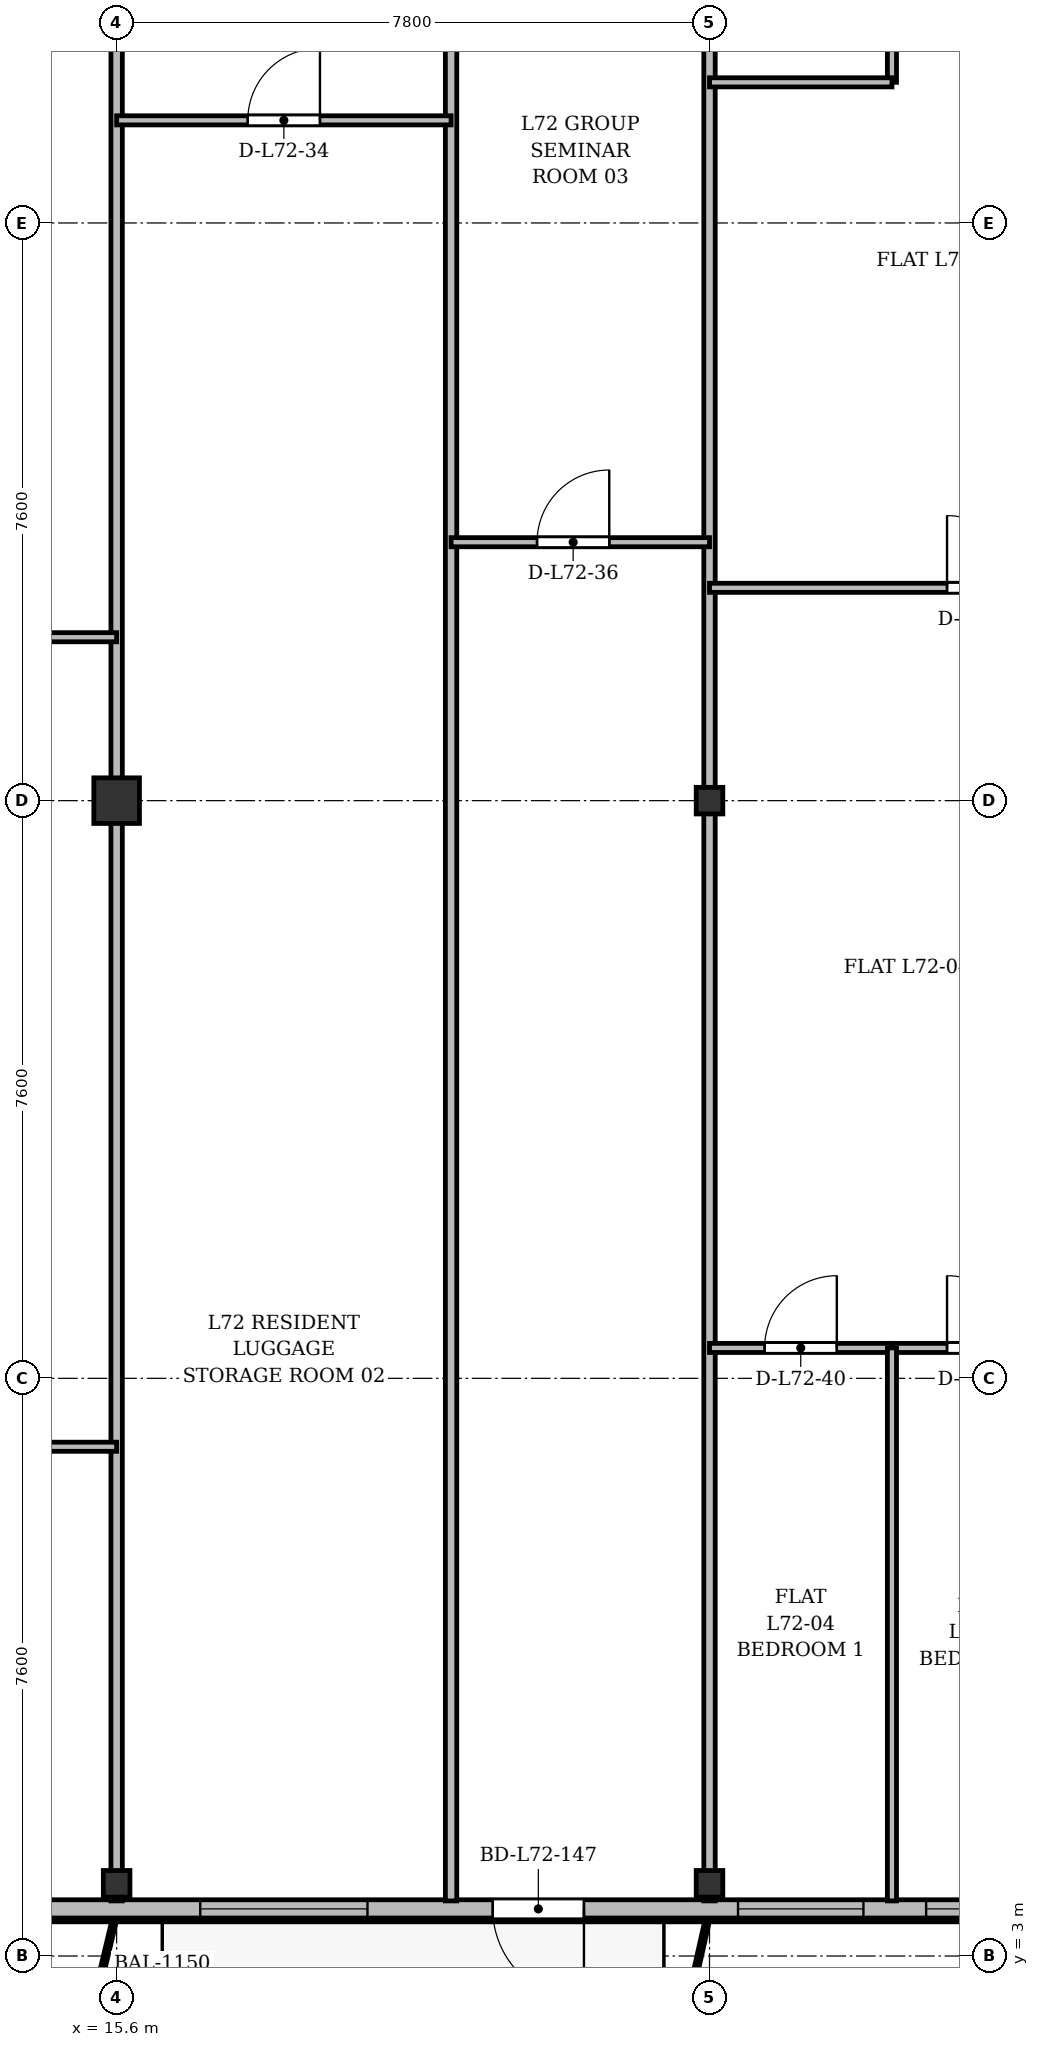
"""IFC4 building model, lengths in metres.
Left out: names, types, materials, properties, quantities, classifications, styles, units other than length and angle.
Written with IfcOpenShell. Run it as: python <this file> out.ifc"""

import sys

from ifc_helpers import new_model, si_unit, direction, frame, frame_2d, origin, origin_2d, place, context, subcontext, project, spatial, rectangle, i_section, extrude, source, transform, mapped, element, fill, save


model = new_model("IFC4")
c1 = context("Model", 3, precision=1e-05, world=origin(), true_north=direction((0.0, 1.0)))
c2 = subcontext(c1, "Body", "Model", "MODEL_VIEW")
j1 = project(units=[si_unit("LENGTHUNIT", "METRE"), si_unit("PLANEANGLEUNIT", "RADIAN")], contexts=[c1])
p1 = place(None, origin())
s1 = spatial("IfcSite", under=j1, at=p1, CompositionType="ELEMENT")
p2 = place(p1, origin())
s2 = spatial("IfcBuilding", under=s1, at=p2, CompositionType="ELEMENT")
p3 = place(p2, frame((0.0, 0.0, 277.5)))
s3 = spatial("IfcBuildingStorey", under=s2, at=p3, CompositionType="ELEMENT", Elevation=277.5)
m1 = source(origin(), c2, "Body", "SweptSolid", [
    extrude(i_section(OverallWidth=0.35, OverallDepth=0.35, WebThickness=0.018, FlangeThickness=0.028, at=origin_2d()), origin(), (0.0, 0.0, 1.0), 3.6),
])
p4 = place(p3, frame((15.6, 3.95, 0.0), z_axis=(0.0, 0.0, 1.0), x_axis=(1.0, 0.0, 0.0)))
e1 = element("IfcColumn", 1, at=p4, inside=s3, PredefinedType="COLUMN", context=c2, shape_type="MappedRepresentation", body=[
    mapped(m1, transform((0.0, 0.0, 0.0), x_axis=(1.0, 0.0, 0.0), y_axis=(0.0, 1.0, 0.0), z_axis=(0.0, 0.0, 1.0), scale=1.0)),
])
m2 = source(origin(), c2, "Body", "SweptSolid", [
    extrude(rectangle(XDim=0.6, YDim=0.6, at=origin_2d()), origin(), (0.0, 0.0, 1.0), 3.6),
])
p5 = place(p3, frame((15.6, 18.2, 0.0), z_axis=(0.0, 0.0, 1.0), x_axis=(1.0, 0.0, 0.0)))
e2 = element("IfcColumn", 2, at=p5, inside=s3, PredefinedType="COLUMN", context=c2, shape_type="MappedRepresentation", body=[
    mapped(m2, transform((0.0, 0.0, 0.0), x_axis=(1.0, 0.0, 0.0), y_axis=(0.0, 1.0, 0.0), z_axis=(0.0, 0.0, 1.0), scale=1.0)),
])
for number, where, z_axis, x_axis in (
    (3, (23.4, 3.95, 0.0), (0.0, 0.0, 1.0), (1.0, 0.0, 0.0)),
    (4, (23.4, 18.2, 0.0), (0.0, 0.0, 1.0), (1.0, 0.0, 0.0)),
):
    element("IfcColumn", number, at=place(p3, frame(where, z_axis=z_axis, x_axis=x_axis)), inside=s3, PredefinedType="COLUMN", context=c2, shape_type="MappedRepresentation", body=[
        mapped(m1, transform((0.0, 0.0, 0.0), x_axis=(1.0, 0.0, 0.0), y_axis=(0.0, 1.0, 0.0), z_axis=(0.0, 0.0, 1.0), scale=1.0)),
    ])
p6 = place(p3, frame((63.2, 3.62, 0.0), z_axis=(0.0, 0.0, 1.0), x_axis=(-1.0, 0.0, 0.0)))
e5 = element("IfcWall", 5, at=p6, inside=s3, PredefinedType="SOLIDWALL", context=c2, shape_type="SweptSolid", body=[
    extrude(rectangle(XDim=52.0, YDim=0.24, at=frame_2d((26.0, 0.0))), origin(), (0.0, 0.0, 1.0), 3.37),
])
p7 = place(p6, frame((1.495, 0.0, 0.9)))
e6 = element("IfcOpeningElement", 6, at=p7, cuts=e5, PredefinedType="OPENING", context=c2, shape_type="SweptSolid", body=[
    extrude(rectangle(XDim=1.5, YDim=1.75, at=frame_2d((0.75, 0.875))), frame((0.0, 0.13, 0.0), z_axis=(0.0, -1.0, 0.0), x_axis=(1.0, 0.0, 0.0)), (0.0, 0.0, 1.0), 0.26),
])
p8 = place(p6, frame((5.2, 0.0, 0.9)))
e7 = element("IfcOpeningElement", 7, at=p8, cuts=e5, PredefinedType="OPENING", context=c2, shape_type="SweptSolid", body=[
    extrude(rectangle(XDim=2.0, YDim=1.95, at=frame_2d((1.0, 0.975))), frame((0.0, 0.13, 0.0), z_axis=(0.0, -1.0, 0.0), x_axis=(1.0, 0.0, 0.0)), (0.0, 0.0, 1.0), 0.26),
])
p9 = place(p6, frame((9.275, 0.0, 0.9)))
e8 = element("IfcOpeningElement", 8, at=p9, cuts=e5, PredefinedType="OPENING", context=c2, shape_type="SweptSolid", body=[
    extrude(rectangle(XDim=1.65, YDim=1.85, at=frame_2d((0.825, 0.925))), frame((0.0, 0.13, 0.0), z_axis=(0.0, -1.0, 0.0), x_axis=(1.0, 0.0, 0.0)), (0.0, 0.0, 1.0), 0.26),
])
p10 = place(p6, frame((14.017, 0.0, 0.0)))
e9 = element("IfcOpeningElement", 9, at=p10, cuts=e5, PredefinedType="OPENING", context=c2, shape_type="SweptSolid", body=[
    extrude(rectangle(XDim=1.2, YDim=2.2, at=frame_2d((0.6, 1.1))), frame((0.0, 0.13, 0.0), z_axis=(0.0, -1.0, 0.0), x_axis=(1.0, 0.0, 0.0)), (0.0, 0.0, 1.0), 0.26),
])
p11 = place(p6, frame((24.9, 0.0, 0.9)))
e10 = element("IfcOpeningElement", 10, at=p11, cuts=e5, PredefinedType="OPENING", context=c2, shape_type="SweptSolid", body=[
    extrude(rectangle(XDim=2.2, YDim=1.8, at=frame_2d((1.1, 0.9))), frame((0.0, 0.13, 0.0), z_axis=(0.0, -1.0, 0.0), x_axis=(1.0, 0.0, 0.0)), (0.0, 0.0, 1.0), 0.26),
])
p12 = place(p6, frame((33.05, 0.0, 0.9)))
e11 = element("IfcOpeningElement", 11, at=p12, cuts=e5, PredefinedType="OPENING", context=c2, shape_type="SweptSolid", body=[
    extrude(rectangle(XDim=1.5, YDim=1.75, at=frame_2d((0.75, 0.875))), frame((0.0, 0.13, 0.0), z_axis=(0.0, -1.0, 0.0), x_axis=(1.0, 0.0, 0.0)), (0.0, 0.0, 1.0), 0.26),
])
p13 = place(p6, frame((35.45, 0.0, 0.9)))
e12 = element("IfcOpeningElement", 12, at=p13, cuts=e5, PredefinedType="OPENING", context=c2, shape_type="SweptSolid", body=[
    extrude(rectangle(XDim=1.5, YDim=1.75, at=frame_2d((0.75, 0.875))), frame((0.0, 0.13, 0.0), z_axis=(0.0, -1.0, 0.0), x_axis=(1.0, 0.0, 0.0)), (0.0, 0.0, 1.0), 0.26),
])
p14 = place(p6, frame((37.775, 0.0, 0.9)))
e13 = element("IfcOpeningElement", 13, at=p14, cuts=e5, PredefinedType="OPENING", context=c2, shape_type="SweptSolid", body=[
    extrude(rectangle(XDim=1.65, YDim=1.85, at=frame_2d((0.825, 0.925))), frame((0.0, 0.13, 0.0), z_axis=(0.0, -1.0, 0.0), x_axis=(1.0, 0.0, 0.0)), (0.0, 0.0, 1.0), 0.26),
])
p15 = place(p6, frame((41.452, 0.0, 0.0)))
e14 = element("IfcOpeningElement", 14, at=p15, cuts=e5, PredefinedType="OPENING", context=c2, shape_type="SweptSolid", body=[
    extrude(rectangle(XDim=1.2, YDim=2.2, at=frame_2d((0.6, 1.1))), frame((0.0, 0.13, 0.0), z_axis=(0.0, -1.0, 0.0), x_axis=(1.0, 0.0, 0.0)), (0.0, 0.0, 1.0), 0.26),
])
p16 = place(p6, frame((44.3, 0.0, 0.9)))
e15 = element("IfcOpeningElement", 15, at=p16, cuts=e5, PredefinedType="OPENING", context=c2, shape_type="SweptSolid", body=[
    extrude(rectangle(XDim=2.2, YDim=1.8, at=frame_2d((1.1, 0.9))), frame((0.0, 0.13, 0.0), z_axis=(0.0, -1.0, 0.0), x_axis=(1.0, 0.0, 0.0)), (0.0, 0.0, 1.0), 0.26),
])
p17 = place(p6, frame((49.005, 0.0, 0.9)))
e16 = element("IfcOpeningElement", 16, at=p17, cuts=e5, PredefinedType="OPENING", context=c2, shape_type="SweptSolid", body=[
    extrude(rectangle(XDim=1.5, YDim=1.75, at=frame_2d((0.75, 0.875))), frame((0.0, 0.13, 0.0), z_axis=(0.0, -1.0, 0.0), x_axis=(1.0, 0.0, 0.0)), (0.0, 0.0, 1.0), 0.26),
])
p18 = place(p3, frame((15.6, 3.725, 0.0), z_axis=(0.0, 0.0, 1.0), x_axis=(0.0, 1.0, 0.0)))
e17 = element("IfcWall", 17, at=p18, inside=s3, PredefinedType="PARTITIONING", context=c2, shape_type="SweptSolid", body=[
    extrude(rectangle(XDim=27.275, YDim=0.15, at=frame_2d((13.637, 0.0))), origin(), (0.0, 0.0, 1.0), 2.87),
])
p19 = place(p3, frame((20.0, 3.725, 0.0), z_axis=(0.0, 0.0, 1.0), x_axis=(0.0, 1.0, 0.0)))
e18 = element("IfcWall", 18, at=p19, inside=s3, PredefinedType="PARTITIONING", context=c2, shape_type="SweptSolid", body=[
    extrude(rectangle(XDim=27.275, YDim=0.15, at=frame_2d((13.637, 0.0))), origin(), (0.0, 0.0, 1.0), 2.92),
])
p20 = place(p3, frame((23.4, 3.725, 0.0), z_axis=(0.0, 0.0, 1.0), x_axis=(0.0, 1.0, 0.0)))
e19 = element("IfcWall", 19, at=p20, inside=s3, PredefinedType="PARTITIONING", context=c2, shape_type="SweptSolid", body=[
    extrude(rectangle(XDim=27.275, YDim=0.15, at=frame_2d((13.637, 0.0))), origin(), (0.0, 0.0, 1.0), 2.87),
])
p21 = place(p3, frame((8.44, 20.35, 0.0), z_axis=(0.0, 0.0, 1.0), x_axis=(1.0, 0.0, 0.0)))
e20 = element("IfcWall", 20, at=p21, inside=s3, PredefinedType="PARTITIONING", context=c2, shape_type="SweptSolid", body=[
    extrude(rectangle(XDim=7.16, YDim=0.12, at=frame_2d((3.58, 0.0))), origin(), (0.0, 0.0, 1.0), 2.87),
])
p22 = place(p21, frame((3.105, 0.0, 0.0)))
e21 = element("IfcOpeningElement", 21, at=p22, cuts=e20, PredefinedType="OPENING", context=c2, shape_type="SweptSolid", body=[
    extrude(rectangle(XDim=0.95, YDim=2.15, at=frame_2d((0.475, 1.075))), frame((0.0, 0.07, 0.0), z_axis=(0.0, -1.0, 0.0), x_axis=(1.0, 0.0, 0.0)), (0.0, 0.0, 1.0), 0.14),
])
p23 = place(p3, frame((8.44, 9.7, 0.0), z_axis=(0.0, 0.0, 1.0), x_axis=(1.0, 0.0, 0.0)))
e22 = element("IfcWall", 22, at=p23, inside=s3, PredefinedType="PARTITIONING", context=c2, shape_type="SweptSolid", body=[
    extrude(rectangle(XDim=7.16, YDim=0.12, at=frame_2d((3.58, 0.0))), origin(), (0.0, 0.0, 1.0), 2.87),
])
p24 = place(p23, frame((3.105, 0.0, 0.0)))
e23 = element("IfcOpeningElement", 23, at=p24, cuts=e22, PredefinedType="OPENING", context=c2, shape_type="SweptSolid", body=[
    extrude(rectangle(XDim=0.95, YDim=2.15, at=frame_2d((0.475, 1.075))), frame((0.0, 0.07, 0.0), z_axis=(0.0, -1.0, 0.0), x_axis=(1.0, 0.0, 0.0)), (0.0, 0.0, 1.0), 0.14),
])
p25 = place(p3, frame((15.6, 27.15, 0.0), z_axis=(0.0, 0.0, 1.0), x_axis=(1.0, 0.0, 0.0)))
e24 = element("IfcWall", 24, at=p25, inside=s3, PredefinedType="PARTITIONING", context=c2, shape_type="SweptSolid", body=[
    extrude(rectangle(XDim=4.4, YDim=0.12, at=frame_2d((2.2, 0.0))), origin(), (0.0, 0.0, 1.0), 2.87),
])
p26 = place(p25, frame((1.725, 0.0, 0.0)))
e25 = element("IfcOpeningElement", 25, at=p26, cuts=e24, PredefinedType="OPENING", context=c2, shape_type="SweptSolid", body=[
    extrude(rectangle(XDim=0.95, YDim=2.15, at=frame_2d((0.475, 1.075))), frame((0.0, 0.07, 0.0), z_axis=(0.0, -1.0, 0.0), x_axis=(1.0, 0.0, 0.0)), (0.0, 0.0, 1.0), 0.14),
])
p27 = place(p3, frame((20.0, 21.6, 0.0), z_axis=(0.0, 0.0, 1.0), x_axis=(1.0, 0.0, 0.0)))
e26 = element("IfcWall", 26, at=p27, inside=s3, PredefinedType="PARTITIONING", context=c2, shape_type="SweptSolid", body=[
    extrude(rectangle(XDim=3.4, YDim=0.12, at=frame_2d((1.7, 0.0))), origin(), (0.0, 0.0, 1.0), 2.87),
])
p28 = place(p27, frame((1.131, 0.0, 0.0)))
e27 = element("IfcOpeningElement", 27, at=p28, cuts=e26, PredefinedType="OPENING", context=c2, shape_type="SweptSolid", body=[
    extrude(rectangle(XDim=0.95, YDim=2.15, at=frame_2d((0.475, 1.075))), frame((0.0, 0.07, 0.0), z_axis=(0.0, -1.0, 0.0), x_axis=(1.0, 0.0, 0.0)), (0.0, 0.0, 1.0), 0.14),
])
p29 = place(p3, frame((23.4, 21.0, 0.0), z_axis=(0.0, 0.0, 1.0), x_axis=(1.0, 0.0, 0.0)))
e28 = element("IfcWall", 28, at=p29, inside=s3, PredefinedType="PARTITIONING", context=c2, shape_type="SweptSolid", body=[
    extrude(rectangle(XDim=7.2, YDim=0.12, at=frame_2d((3.6, 0.0))), origin(), (0.0, 0.0, 1.0), 2.87),
])
p30 = place(p29, frame((3.125, 0.0, 0.0)))
e29 = element("IfcOpeningElement", 29, at=p30, cuts=e28, PredefinedType="OPENING", context=c2, shape_type="SweptSolid", body=[
    extrude(rectangle(XDim=0.95, YDim=2.15, at=frame_2d((0.475, 1.075))), frame((0.0, 0.07, 0.0), z_axis=(0.0, -1.0, 0.0), x_axis=(1.0, 0.0, 0.0)), (0.0, 0.0, 1.0), 0.14),
])
p31 = place(p3, frame((25.8, 27.65, 0.0), z_axis=(0.0, 0.0, 1.0), x_axis=(0.0, 1.0, 0.0)))
e30 = element("IfcWall", 30, at=p31, inside=s3, PredefinedType="PARTITIONING", context=c2, shape_type="SweptSolid", body=[
    extrude(rectangle(XDim=3.35, YDim=0.12, at=frame_2d((1.675, 0.0))), origin(), (0.0, 0.0, 1.0), 3.37),
])
p32 = place(p31, frame((0.8, 0.0, 0.0)))
e31 = element("IfcOpeningElement", 31, at=p32, cuts=e30, PredefinedType="OPENING", context=c2, shape_type="SweptSolid", body=[
    extrude(rectangle(XDim=0.85, YDim=2.1, at=frame_2d((0.425, 1.05))), frame((0.0, 0.07, 0.0), z_axis=(0.0, -1.0, 0.0), x_axis=(1.0, 0.0, 0.0)), (0.0, 0.0, 1.0), 0.14),
])
p33 = place(p3, frame((23.4, 27.65, 0.0), z_axis=(0.0, 0.0, 1.0), x_axis=(1.0, 0.0, 0.0)))
e32 = element("IfcWall", 32, at=p33, inside=s3, PredefinedType="PARTITIONING", context=c2, shape_type="SweptSolid", body=[
    extrude(rectangle(XDim=2.4, YDim=0.12, at=frame_2d((1.2, 0.0))), origin(), (0.0, 0.0, 1.0), 2.87),
])
p34 = place(p3, frame((23.4, 11.0, 0.0), z_axis=(0.0, 0.0, 1.0), x_axis=(1.0, 0.0, 0.0)))
e33 = element("IfcWall", 33, at=p34, inside=s3, PredefinedType="PARTITIONING", context=c2, shape_type="SweptSolid", body=[
    extrude(rectangle(XDim=2.4, YDim=0.12, at=frame_2d((1.2, 0.0))), origin(), (0.0, 0.0, 1.0), 2.87),
])
p35 = place(p34, frame((0.725, 0.0, 0.0)))
e34 = element("IfcOpeningElement", 34, at=p35, cuts=e33, PredefinedType="OPENING", context=c2, shape_type="SweptSolid", body=[
    extrude(rectangle(XDim=0.95, YDim=2.15, at=frame_2d((0.475, 1.075))), frame((0.0, 0.07, 0.0), z_axis=(0.0, -1.0, 0.0), x_axis=(1.0, 0.0, 0.0)), (0.0, 0.0, 1.0), 0.14),
])
p36 = place(p3, frame((25.8, 11.0, 0.0), z_axis=(0.0, 0.0, 1.0), x_axis=(1.0, 0.0, 0.0)))
e35 = element("IfcWall", 35, at=p36, inside=s3, PredefinedType="PARTITIONING", context=c2, shape_type="SweptSolid", body=[
    extrude(rectangle(XDim=2.4, YDim=0.12, at=frame_2d((1.2, 0.0))), origin(), (0.0, 0.0, 1.0), 3.07),
])
p37 = place(p36, frame((0.725, 0.0, 0.0)))
e36 = element("IfcOpeningElement", 36, at=p37, cuts=e35, PredefinedType="OPENING", context=c2, shape_type="SweptSolid", body=[
    extrude(rectangle(XDim=0.95, YDim=2.15, at=frame_2d((0.475, 1.075))), frame((0.0, 0.07, 0.0), z_axis=(0.0, -1.0, 0.0), x_axis=(1.0, 0.0, 0.0)), (0.0, 0.0, 1.0), 0.14),
])
p38 = place(p3, frame((25.8, 3.725, 0.0), z_axis=(0.0, 0.0, 1.0), x_axis=(0.0, 1.0, 0.0)))
e37 = element("IfcWall", 37, at=p38, inside=s3, PredefinedType="PARTITIONING", context=c2, shape_type="SweptSolid", body=[
    extrude(rectangle(XDim=7.275, YDim=0.12, at=frame_2d((3.637, 0.0))), origin(), (0.0, 0.0, 1.0), 2.92),
])
m3 = source(origin(), c2, "Body", "SweptSolid", [
    extrude(rectangle(XDim=1.5, YDim=1.75, at=frame_2d((0.75, 0.875))), frame((0.0, 0.03, 0.0), z_axis=(0.0, -1.0, 0.0), x_axis=(1.0, 0.0, 0.0)), (0.0, 0.0, 1.0), 0.06),
])
p39 = place(p13, origin())
e38 = element("IfcWindow", 38, at=p39, inside=s3, PartitioningType="SINGLE_PANEL", PredefinedType="WINDOW", context=c2, shape_type="MappedRepresentation", body=[
    mapped(m3, transform((0.0, 0.0, 0.0), x_axis=(1.0, 0.0, 0.0), y_axis=(0.0, 1.0, 0.0), z_axis=(0.0, 0.0, 1.0), scale=1.0)),
])
fill(e12, e38)
m4 = source(origin(), c2, "Body", "SweptSolid", [
    extrude(rectangle(XDim=1.65, YDim=1.85, at=frame_2d((0.825, 0.925))), frame((0.0, 0.03, 0.0), z_axis=(0.0, -1.0, 0.0), x_axis=(1.0, 0.0, 0.0)), (0.0, 0.0, 1.0), 0.06),
])
p40 = place(p14, origin())
e39 = element("IfcWindow", 39, at=p40, inside=s3, PartitioningType="SINGLE_PANEL", PredefinedType="WINDOW", context=c2, shape_type="MappedRepresentation", body=[
    mapped(m4, transform((0.0, 0.0, 0.0), x_axis=(1.0, 0.0, 0.0), y_axis=(0.0, 1.0, 0.0), z_axis=(0.0, 0.0, 1.0), scale=1.0)),
])
fill(e13, e39)
m5 = source(origin(), c2, "Body", "SweptSolid", [
    extrude(rectangle(XDim=1.2, YDim=2.2, at=frame_2d((0.6, 1.1))), frame((0.0, 0.025, 0.0), z_axis=(0.0, -1.0, 0.0), x_axis=(1.0, 0.0, 0.0)), (0.0, 0.0, 1.0), 0.05),
])
p41 = place(p15, origin())
e40 = element("IfcDoor", 40, at=p41, inside=s3, OperationType="SINGLE_SWING_LEFT", PredefinedType="DOOR", context=c2, shape_type="MappedRepresentation", body=[
    mapped(m5, transform((0.0, 0.0, 0.0), x_axis=(1.0, 0.0, 0.0), y_axis=(0.0, 1.0, 0.0), z_axis=(0.0, 0.0, 1.0), scale=1.0)),
])
fill(e14, e40)
m6 = source(origin(), c2, "Body", "SweptSolid", [
    extrude(rectangle(XDim=2.2, YDim=1.8, at=frame_2d((1.1, 0.9))), frame((0.0, 0.03, 0.0), z_axis=(0.0, -1.0, 0.0), x_axis=(1.0, 0.0, 0.0)), (0.0, 0.0, 1.0), 0.06),
])
p42 = place(p16, origin())
e41 = element("IfcWindow", 41, at=p42, inside=s3, PartitioningType="SINGLE_PANEL", PredefinedType="WINDOW", context=c2, shape_type="MappedRepresentation", body=[
    mapped(m6, transform((0.0, 0.0, 0.0), x_axis=(1.0, 0.0, 0.0), y_axis=(0.0, 1.0, 0.0), z_axis=(0.0, 0.0, 1.0), scale=1.0)),
])
fill(e15, e41)
m7 = source(origin(), c2, "Body", "SweptSolid", [
    extrude(rectangle(XDim=0.95, YDim=2.15, at=frame_2d((0.475, 1.075))), frame((0.0, 0.025, 0.0), z_axis=(0.0, -1.0, 0.0), x_axis=(1.0, 0.0, 0.0)), (0.0, 0.0, 1.0), 0.05),
])
p43 = place(p26, origin())
e42 = element("IfcDoor", 42, at=p43, inside=s3, OperationType="SINGLE_SWING_RIGHT", PredefinedType="DOOR", context=c2, shape_type="MappedRepresentation", body=[
    mapped(m7, transform((0.0, 0.0, 0.0), x_axis=(1.0, 0.0, 0.0), y_axis=(0.0, 1.0, 0.0), z_axis=(0.0, 0.0, 1.0), scale=1.0)),
])
fill(e25, e42)
p44 = place(p28, origin())
e43 = element("IfcDoor", 43, at=p44, inside=s3, OperationType="SINGLE_SWING_RIGHT", PredefinedType="DOOR", context=c2, shape_type="MappedRepresentation", body=[
    mapped(m7, transform((0.0, 0.0, 0.0), x_axis=(1.0, 0.0, 0.0), y_axis=(0.0, 1.0, 0.0), z_axis=(0.0, 0.0, 1.0), scale=1.0)),
])
fill(e27, e43)
p45 = place(p30, origin())
e44 = element("IfcDoor", 44, at=p45, inside=s3, OperationType="SINGLE_SWING_LEFT", PredefinedType="DOOR", context=c2, shape_type="MappedRepresentation", body=[
    mapped(m7, transform((0.0, 0.0, 0.0), x_axis=(1.0, 0.0, 0.0), y_axis=(0.0, 1.0, 0.0), z_axis=(0.0, 0.0, 1.0), scale=1.0)),
])
fill(e29, e44)
p46 = place(p35, origin())
e45 = element("IfcDoor", 45, at=p46, inside=s3, OperationType="SINGLE_SWING_RIGHT", PredefinedType="DOOR", context=c2, shape_type="MappedRepresentation", body=[
    mapped(m7, transform((0.0, 0.0, 0.0), x_axis=(1.0, 0.0, 0.0), y_axis=(0.0, 1.0, 0.0), z_axis=(0.0, 0.0, 1.0), scale=1.0)),
])
fill(e34, e45)
p47 = place(p37, origin())
e46 = element("IfcDoor", 46, at=p47, inside=s3, OperationType="SINGLE_SWING_LEFT", PredefinedType="DOOR", context=c2, shape_type="MappedRepresentation", body=[
    mapped(m7, transform((0.0, 0.0, 0.0), x_axis=(1.0, 0.0, 0.0), y_axis=(0.0, 1.0, 0.0), z_axis=(0.0, 0.0, 1.0), scale=1.0)),
])
fill(e36, e46)
save(model, sys.argv[1])
